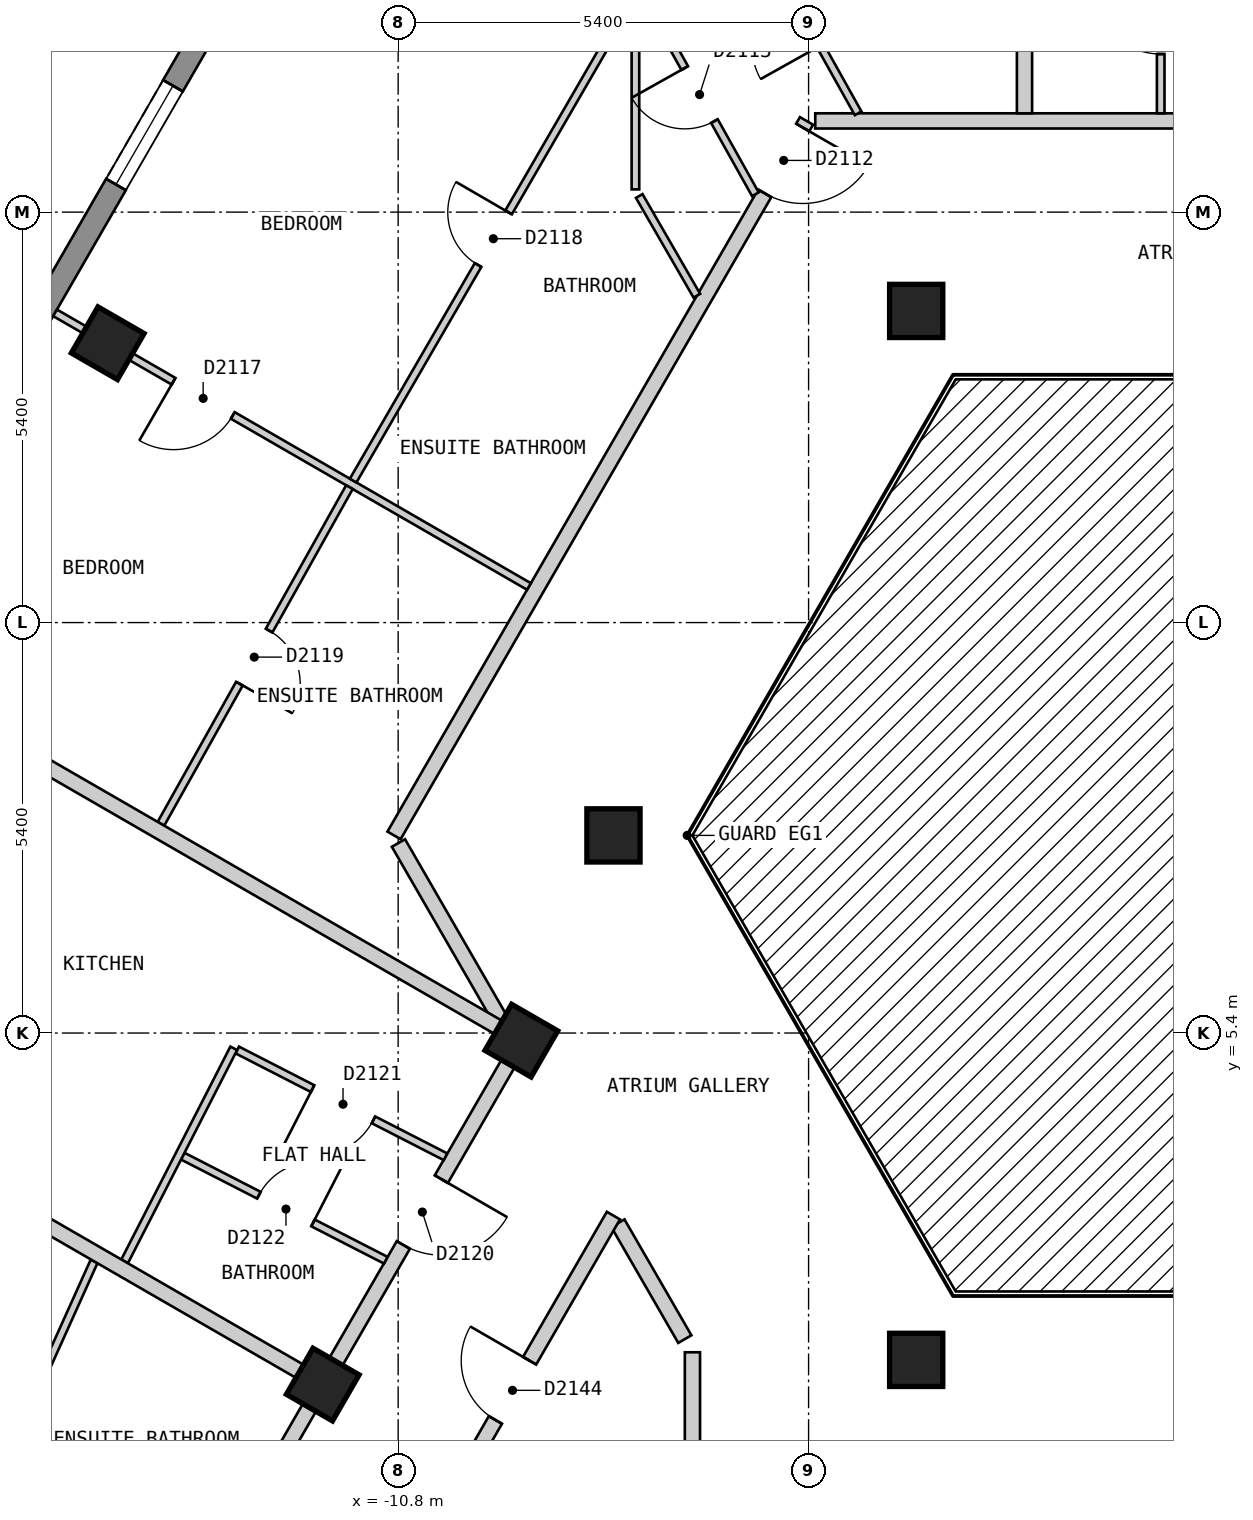
"""IFC4 building model, lengths in metres.
Left out: names, types, materials, properties, quantities, classifications, styles, units other than length and angle.
Written with IfcOpenShell. Run it as: python <this file> out.ifc"""

import sys

from ifc_helpers import new_model, si_unit, direction, frame, frame_2d, origin, origin_2d, place, context, subcontext, project, spatial, polyline, rectangle, outline, extrude, element, fill, save


model = new_model("IFC4")
c1 = context("Model", 3, precision=1e-05, world=origin(), true_north=direction((0.0, 1.0)))
c2 = subcontext(c1, "Body", "Model", "MODEL_VIEW")
j1 = project(units=[si_unit("LENGTHUNIT", "METRE"), si_unit("PLANEANGLEUNIT", "RADIAN")], contexts=[c1])
p1 = place(None, origin())
s1 = spatial("IfcSite", under=j1, at=p1, CompositionType="ELEMENT")
p2 = place(p1, origin())
s2 = spatial("IfcBuilding", under=s1, at=p2, CompositionType="ELEMENT")
p3 = place(p2, frame((0.0, 0.0, 211.8)))
s3 = spatial("IfcBuildingStorey", under=s2, at=p3, CompositionType="ELEMENT", Elevation=211.8)
for number, where, z_axis, x_axis in (
    (1, (-14.621, 14.475, 0.0), (0.0, 0.0, 1.0), (-0.5, -0.866, 0.0)),
    (2, (-3.984, 14.9, 0.0), (0.0, 0.0, 1.0), (1.0, 0.0, 0.0)),
    (3, (-7.967, 8.0, 0.0), (0.0, 0.0, 1.0), (1.0, 0.0, 0.0)),
    (4, (-9.179, 5.3, 0.0), (0.0, 0.0, 1.0), (-0.5, -0.866, 0.0)),
    (5, (-3.984, 1.1, 0.0), (0.0, 0.0, 1.0), (1.0, 0.0, 0.0)),
    (6, (-11.792, 0.775, 0.0), (0.0, 0.0, 1.0), (-0.5, -0.866, 0.0)),
):
    element("IfcColumn", number, at=place(p3, frame(where, z_axis=z_axis, x_axis=x_axis)), inside=s3, PredefinedType="COLUMN", context=c2, shape_type="SweptSolid", body=[
        extrude(rectangle(XDim=0.7, YDim=0.7, at=origin_2d()), origin(), (0.0, 0.0, 1.0), 3.0),
    ])
p4 = place(p3, frame((-12.514, 20.025, 0.0), z_axis=(0.0, 0.0, 1.0), x_axis=(-0.500003656944, -0.866023292436, 0.0)))
e7 = element("IfcWall", 7, at=p4, inside=s3, PredefinedType="SOLIDWALL", context=c2, shape_type="SweptSolid", body=[
    extrude(outline(polyline([(0.0, -0.15), (22.17, -0.15), (22.09, 0.15), (0.08, 0.15), (0.0, -0.15)])), origin(), (0.0, 0.0, 1.0), 2.7),
])
p5 = place(p4, frame((2.497, 0.0, 0.15)))
e8 = element("IfcOpeningElement", 8, at=p5, cuts=e7, PredefinedType="OPENING", context=c2, shape_type="SweptSolid", body=[
    extrude(rectangle(XDim=1.5, YDim=2.1, at=frame_2d((0.75, 1.05))), frame((0.0, 0.16, 0.0), z_axis=(0.0, -1.0, 0.0), x_axis=(1.0, 0.0, 0.0)), (0.0, 0.0, 1.0), 0.32),
])
p6 = place(p4, frame((7.722, 0.0, 0.15)))
e9 = element("IfcOpeningElement", 9, at=p6, cuts=e7, PredefinedType="OPENING", context=c2, shape_type="SweptSolid", body=[
    extrude(rectangle(XDim=1.5, YDim=2.1, at=frame_2d((0.75, 1.05))), frame((0.0, 0.16, 0.0), z_axis=(0.0, -1.0, 0.0), x_axis=(1.0, 0.0, 0.0)), (0.0, 0.0, 1.0), 0.32),
])
p7 = place(p4, frame((12.948, 0.0, 0.15)))
e10 = element("IfcOpeningElement", 10, at=p7, cuts=e7, PredefinedType="OPENING", context=c2, shape_type="SweptSolid", body=[
    extrude(rectangle(XDim=1.5, YDim=2.1, at=frame_2d((0.75, 1.05))), frame((0.0, 0.16, 0.0), z_axis=(0.0, -1.0, 0.0), x_axis=(1.0, 0.0, 0.0)), (0.0, 0.0, 1.0), 0.32),
])
p8 = place(p4, frame((18.173, 0.0, 0.15)))
e11 = element("IfcOpeningElement", 11, at=p8, cuts=e7, PredefinedType="OPENING", context=c2, shape_type="SweptSolid", body=[
    extrude(rectangle(XDim=1.5, YDim=2.1, at=frame_2d((0.75, 1.05))), frame((0.0, 0.16, 0.0), z_axis=(0.0, -1.0, 0.0), x_axis=(1.0, 0.0, 0.0)), (0.0, 0.0, 1.0), 0.32),
])
p9 = place(p3, frame((-10.796, 7.9, 0.0), z_axis=(0.0, 0.0, 1.0), x_axis=(0.499698840221, -0.866199208659, 0.0)))
e12 = element("IfcWall", 12, at=p9, inside=s3, PredefinedType="PARTITIONING", context=c2, shape_type="SweptSolid", body=[
    extrude(rectangle(XDim=2.685, YDim=0.2, at=frame_2d((1.343, 0.0))), origin(), (0.0, 0.0, 1.0), 2.7),
])
p10 = place(p3, frame((-7.909, 2.898, 0.0), z_axis=(0.0, 0.0, 1.0), x_axis=(0.50019444547, -0.865913111531, 0.0)))
e13 = element("IfcWall", 13, at=p10, inside=s3, PredefinedType="PARTITIONING", context=c2, shape_type="SweptSolid", body=[
    extrude(rectangle(XDim=1.761, YDim=0.2, at=frame_2d((0.88, 0.0))), origin(), (0.0, 0.0, 1.0), 2.7),
])
p11 = place(p3, frame((-5.312, 17.4, 0.0), z_axis=(0.0, 0.0, 1.0), x_axis=(1.0, 0.0, 0.0)))
e14 = element("IfcWall", 14, at=p11, inside=s3, PredefinedType="PARTITIONING", context=c2, shape_type="SweptSolid", body=[
    extrude(rectangle(XDim=10.739, YDim=0.2, at=frame_2d((5.37, 0.0))), origin(), (0.0, 0.0, 1.0), 2.7),
])
p12 = place(p11, frame((9.534, 0.0, 0.0)))
e15 = element("IfcOpeningElement", 15, at=p12, cuts=e14, PredefinedType="OPENING", context=c2, shape_type="SweptSolid", body=[
    extrude(rectangle(XDim=1.0, YDim=2.1, at=frame_2d((0.5, 1.05))), frame((0.0, 0.11, 0.0), z_axis=(0.0, -1.0, 0.0), x_axis=(1.0, 0.0, 0.0)), (0.0, 0.0, 1.0), 0.22),
])
p13 = place(p11, frame((4.812, 0.0, 0.0)))
e16 = element("IfcOpeningElement", 16, at=p13, cuts=e14, PredefinedType="OPENING", context=c2, shape_type="SweptSolid", body=[
    extrude(rectangle(XDim=1.0, YDim=2.1, at=frame_2d((0.5, 1.05))), frame((0.0, 0.11, 0.0), z_axis=(0.0, -1.0, 0.0), x_axis=(1.0, 0.0, 0.0)), (0.0, 0.0, 1.0), 0.22),
])
p14 = place(p3, frame((-10.623, -1.6, 0.0), z_axis=(0.0, 0.0, 1.0), x_axis=(0.500040865889, 0.866001808567, 0.0)))
e17 = element("IfcWall", 17, at=p14, inside=s3, PredefinedType="PARTITIONING", context=c2, shape_type="SweptSolid", body=[
    extrude(rectangle(XDim=5.31, YDim=0.2, at=frame_2d((2.655, 0.0))), origin(), (0.0, 0.0, 1.0), 2.7),
])
p15 = place(p14, frame((2.205, 0.0, 0.0)))
e18 = element("IfcOpeningElement", 18, at=p15, cuts=e17, PredefinedType="OPENING", context=c2, shape_type="SweptSolid", body=[
    extrude(rectangle(XDim=0.9, YDim=2.1, at=frame_2d((0.45, 1.05))), frame((0.0, 0.11, 0.0), z_axis=(0.0, -1.0, 0.0), x_axis=(1.0, 0.0, 0.0)), (0.0, 0.0, 1.0), 0.22),
])
p16 = place(p3, frame((-13.106, -1.5, 0.0), z_axis=(0.0, 0.0, 1.0), x_axis=(0.500025705601, 0.86601056214, 0.0)))
e19 = element("IfcWall", 19, at=p16, inside=s3, PredefinedType="PARTITIONING", context=c2, shape_type="SweptSolid", body=[
    extrude(rectangle(XDim=7.735, YDim=0.2, at=frame_2d((3.868, 0.0))), origin(), (0.0, 0.0, 1.0), 2.7),
])
p17 = place(p16, frame((4.748, 0.0, 0.0)))
e20 = element("IfcOpeningElement", 20, at=p17, cuts=e19, PredefinedType="OPENING", context=c2, shape_type="SweptSolid", body=[
    extrude(rectangle(XDim=1.0, YDim=2.1, at=frame_2d((0.5, 1.05))), frame((0.0, 0.11, 0.0), z_axis=(0.0, -1.0, 0.0), x_axis=(1.0, 0.0, 0.0)), (0.0, 0.0, 1.0), 0.22),
])
p18 = place(p3, frame((-10.854, 8.0, 0.0), z_axis=(0.0, 0.0, 1.0), x_axis=(0.499997637144, 0.866026767976, 0.0)))
e21 = element("IfcWall", 21, at=p18, inside=s3, PredefinedType="PARTITIONING", context=c2, shape_type="SweptSolid", body=[
    extrude(rectangle(XDim=10.854, YDim=0.2, at=frame_2d((5.427, 0.0))), origin(), (0.0, 0.0, 1.0), 2.7),
])
p19 = place(p18, frame((9.754, 0.0, 0.0)))
e22 = element("IfcOpeningElement", 22, at=p19, cuts=e21, PredefinedType="OPENING", context=c2, shape_type="SweptSolid", body=[
    extrude(rectangle(XDim=1.0, YDim=2.1, at=frame_2d((0.5, 1.05))), frame((0.0, 0.11, 0.0), z_axis=(0.0, -1.0, 0.0), x_axis=(1.0, 0.0, 0.0)), (0.0, 0.0, 1.0), 0.22),
])
p20 = place(p3, frame((-6.928, -2.799, 0.0), z_axis=(0.0, 0.0, 1.0), x_axis=(0.0, 1.0, 0.0)))
e23 = element("IfcWall", 23, at=p20, inside=s3, PredefinedType="PARTITIONING", context=c2, shape_type="SweptSolid", body=[
    extrude(rectangle(XDim=3.999, YDim=0.2, at=frame_2d((2.0, 0.0))), origin(), (0.0, 0.0, 1.0), 2.7),
])
p21 = place(p3, frame((-7.628, 16.412, 0.0), z_axis=(0.0, 0.0, 1.0), x_axis=(0.500159472144, -0.86593331292, 0.0)))
e24 = element("IfcWall", 24, at=p21, inside=s3, PredefinedType="PARTITIONING", context=c2, shape_type="SweptSolid", body=[
    extrude(rectangle(XDim=1.515, YDim=0.1, at=frame_2d((0.758, 0.0))), origin(), (0.0, 0.0, 1.0), 2.7),
])
p22 = place(p3, frame((-6.211, 20.115, 0.0), z_axis=(0.0, 0.0, 1.0), x_axis=(0.488221234931, -0.872719901092, 0.0)))
e25 = element("IfcWall", 25, at=p22, inside=s3, PredefinedType="PARTITIONING", context=c2, shape_type="SweptSolid", body=[
    extrude(rectangle(XDim=2.996, YDim=0.1, at=frame_2d((1.498, 0.0))), origin(), (0.0, 0.0, 1.0), 2.7),
])
p23 = place(p22, frame((1.077, 0.0, 0.0)))
e26 = element("IfcOpeningElement", 26, at=p23, cuts=e25, PredefinedType="OPENING", context=c2, shape_type="SweptSolid", body=[
    extrude(rectangle(XDim=0.9, YDim=2.1, at=frame_2d((0.45, 1.05))), frame((0.0, 0.06, 0.0), z_axis=(0.0, -1.0, 0.0), x_axis=(1.0, 0.0, 0.0)), (0.0, 0.0, 1.0), 0.12),
])
p24 = place(p3, frame((-7.575, 19.07, 0.0), z_axis=(0.0, 0.0, 1.0), x_axis=(0.488413788688, -0.872612153834, 0.0)))
e27 = element("IfcWall", 27, at=p24, inside=s3, PredefinedType="PARTITIONING", context=c2, shape_type="SweptSolid", body=[
    extrude(rectangle(XDim=3.02, YDim=0.1, at=frame_2d((1.51, 0.0))), origin(), (0.0, 0.0, 1.0), 2.7),
])
p25 = place(p24, frame((1.117, 0.0, 0.0)))
e28 = element("IfcOpeningElement", 28, at=p25, cuts=e27, PredefinedType="OPENING", context=c2, shape_type="SweptSolid", body=[
    extrude(rectangle(XDim=0.8, YDim=2.1, at=frame_2d((0.4, 1.05))), frame((0.0, 0.06, 0.0), z_axis=(0.0, -1.0, 0.0), x_axis=(1.0, 0.0, 0.0)), (0.0, 0.0, 1.0), 0.12),
])
p26 = place(p3, frame((-12.917, 5.177, 0.0), z_axis=(0.0, 0.0, 1.0), x_axis=(0.889829844516, -0.456292502467, 0.0)))
e29 = element("IfcWall", 29, at=p26, inside=s3, PredefinedType="PARTITIONING", context=c2, shape_type="SweptSolid", body=[
    extrude(rectangle(XDim=3.079, YDim=0.1, at=frame_2d((1.54, 0.0))), origin(), (0.0, 0.0, 1.0), 2.7),
])
p27 = place(p26, frame((1.114, 0.0, 0.0)))
e30 = element("IfcOpeningElement", 30, at=p27, cuts=e29, PredefinedType="OPENING", context=c2, shape_type="SweptSolid", body=[
    extrude(rectangle(XDim=0.9, YDim=2.1, at=frame_2d((0.45, 1.05))), frame((0.0, 0.06, 0.0), z_axis=(0.0, -1.0, 0.0), x_axis=(1.0, 0.0, 0.0)), (0.0, 0.0, 1.0), 0.12),
])
p28 = place(p3, frame((-13.634, 3.78, 0.0), z_axis=(0.0, 0.0, 1.0), x_axis=(0.889908901513, -0.456138298116, 0.0)))
e31 = element("IfcWall", 31, at=p28, inside=s3, PredefinedType="PARTITIONING", context=c2, shape_type="SweptSolid", body=[
    extrude(rectangle(XDim=3.002, YDim=0.1, at=frame_2d((1.501, 0.0))), origin(), (0.0, 0.0, 1.0), 2.7),
])
p29 = place(p28, frame((1.126, 0.0, 0.0)))
e32 = element("IfcOpeningElement", 32, at=p29, cuts=e31, PredefinedType="OPENING", context=c2, shape_type="SweptSolid", body=[
    extrude(rectangle(XDim=0.8, YDim=2.1, at=frame_2d((0.4, 1.05))), frame((0.0, 0.06, 0.0), z_axis=(0.0, -1.0, 0.0), x_axis=(1.0, 0.0, 0.0)), (0.0, 0.0, 1.0), 0.12),
])
p30 = place(p3, frame((-15.314, 14.875, 0.0), z_axis=(0.0, 0.0, 1.0), x_axis=(0.866001485781, -0.500041424909, 0.0)))
e33 = element("IfcWall", 33, at=p30, inside=s3, PredefinedType="PARTITIONING", context=c2, shape_type="SweptSolid", body=[
    extrude(rectangle(XDim=7.2, YDim=0.1, at=frame_2d((3.6, 0.0))), origin(), (0.0, 0.0, 1.0), 2.7),
])
p31 = place(p30, frame((1.8, 0.0, 0.0)))
e34 = element("IfcOpeningElement", 34, at=p31, cuts=e33, PredefinedType="OPENING", context=c2, shape_type="SweptSolid", body=[
    extrude(rectangle(XDim=0.9, YDim=2.1, at=frame_2d((0.45, 1.05))), frame((0.0, 0.06, 0.0), z_axis=(0.0, -1.0, 0.0), x_axis=(1.0, 0.0, 0.0)), (0.0, 0.0, 1.0), 0.12),
])
p32 = place(p3, frame((-15.575, 0.677, 0.0), z_axis=(0.0, 0.0, 1.0), x_axis=(0.410768223147, 0.911739802165, 0.0)))
e35 = element("IfcWall", 35, at=p32, inside=s3, PredefinedType="PARTITIONING", context=c2, shape_type="SweptSolid", body=[
    extrude(rectangle(XDim=1.886, YDim=0.1, at=frame_2d((0.943, 0.0))), origin(), (0.0, 0.0, 1.0), 2.7),
])
p33 = place(p3, frame((-11.392, 12.668, 0.0), z_axis=(0.0, 0.0, 1.0), x_axis=(0.501440551074, 0.865192102217, 0.0)))
e36 = element("IfcWall", 36, at=p33, inside=s3, PredefinedType="PARTITIONING", context=c2, shape_type="SweptSolid", body=[
    extrude(rectangle(XDim=7.307, YDim=0.1, at=frame_2d((3.654, 0.0))), origin(), (0.0, 0.0, 1.0), 2.7),
])
p34 = place(p33, frame((3.278, 0.0, 0.0)))
e37 = element("IfcOpeningElement", 37, at=p34, cuts=e36, PredefinedType="OPENING", context=c2, shape_type="SweptSolid", body=[
    extrude(rectangle(XDim=0.8, YDim=2.1, at=frame_2d((0.4, 1.05))), frame((0.0, 0.06, 0.0), z_axis=(0.0, -1.0, 0.0), x_axis=(1.0, 0.0, 0.0)), (0.0, 0.0, 1.0), 0.12),
])
p35 = place(p3, frame((-13.921, 8.153, 0.0), z_axis=(0.0, 0.0, 1.0), x_axis=(0.488568218554, 0.872525699231, 0.0)))
e38 = element("IfcWall", 38, at=p35, inside=s3, PredefinedType="PARTITIONING", context=c2, shape_type="SweptSolid", body=[
    extrude(rectangle(XDim=5.076, YDim=0.1, at=frame_2d((2.538, 0.0))), origin(), (0.0, 0.0, 1.0), 2.7),
])
p36 = place(p35, frame((2.113, 0.0, 0.0)))
e39 = element("IfcOpeningElement", 39, at=p36, cuts=e38, PredefinedType="OPENING", context=c2, shape_type="SweptSolid", body=[
    extrude(rectangle(XDim=0.8, YDim=2.1, at=frame_2d((0.4, 1.05))), frame((0.0, 0.06, 0.0), z_axis=(0.0, -1.0, 0.0), x_axis=(1.0, 0.0, 0.0)), (0.0, 0.0, 1.0), 0.12),
])
p37 = place(p3, frame((-14.399, 2.396, 0.0), z_axis=(0.0, 0.0, 1.0), x_axis=(0.455967231787, 0.889996563778, 0.0)))
e40 = element("IfcWall", 40, at=p37, inside=s3, PredefinedType="PARTITIONING", context=c2, shape_type="SweptSolid", body=[
    extrude(rectangle(XDim=3.149, YDim=0.1, at=frame_2d((1.575, 0.0))), origin(), (0.0, 0.0, 1.0), 2.7),
])
p38 = place(p3, frame((-7.678, 16.499, 0.0), z_axis=(0.0, 0.0, 1.0), x_axis=(0.0, 1.0, 0.0)))
e41 = element("IfcWall", 41, at=p38, inside=s3, PredefinedType="PARTITIONING", context=c2, shape_type="SweptSolid", body=[
    extrude(rectangle(XDim=5.801, YDim=0.1, at=frame_2d((2.9, 0.0))), origin(), (0.0, 0.0, 1.0), 2.7),
])
p39 = place(p38, frame((3.44, 0.0, 0.0)))
e42 = element("IfcOpeningElement", 42, at=p39, cuts=e41, PredefinedType="OPENING", context=c2, shape_type="SweptSolid", body=[
    extrude(rectangle(XDim=0.9, YDim=2.1, at=frame_2d((0.45, 1.05))), frame((0.0, 0.06, 0.0), z_axis=(0.0, -1.0, 0.0), x_axis=(1.0, 0.0, 0.0)), (0.0, 0.0, 1.0), 0.12),
])
p40 = place(p3, frame((-0.767, 17.5, 0.0), z_axis=(0.0, 0.0, 1.0), x_axis=(0.0, 1.0, 0.0)))
e43 = element("IfcWall", 43, at=p40, inside=s3, PredefinedType="PARTITIONING", context=c2, shape_type="SweptSolid", body=[
    extrude(rectangle(XDim=2.559, YDim=0.1, at=frame_2d((1.28, 0.0))), origin(), (0.0, 0.0, 1.0), 2.7),
])
p41 = place(p40, frame((0.78, 0.0, 0.0)))
e44 = element("IfcOpeningElement", 44, at=p41, cuts=e43, PredefinedType="OPENING", context=c2, shape_type="SweptSolid", body=[
    extrude(rectangle(XDim=0.9, YDim=2.1, at=frame_2d((0.45, 1.05))), frame((0.0, 0.06, 0.0), z_axis=(0.0, -1.0, 0.0), x_axis=(1.0, 0.0, 0.0)), (0.0, 0.0, 1.0), 0.12),
])
p42 = place(p3, frame((-2.559, 20.22, 0.0), z_axis=(0.0, 0.0, 1.0), x_axis=(0.0, -1.0, 0.0)))
e45 = element("IfcWall", 45, at=p42, inside=s3, PredefinedType="PARTITIONING", context=c2, shape_type="SweptSolid", body=[
    extrude(rectangle(XDim=2.72, YDim=0.2, at=frame_2d((1.36, 0.0))), origin(), (0.0, 0.0, 1.0), 2.7),
])
p43 = place(p3, frame((-20.539, 5.825, 0.0), z_axis=(0.0, 0.0, 1.0), x_axis=(0.866046068403, -0.499964206122, 0.0)))
e46 = element("IfcWall", 46, at=p43, inside=s3, PredefinedType="PARTITIONING", context=c2, shape_type="SweptSolid", body=[
    extrude(rectangle(XDim=9.995, YDim=0.2, at=frame_2d((4.998, 0.0))), origin(), (0.0, 0.0, 1.0), 2.7),
])
p44 = place(p3, frame((-17.926, 10.35, 0.0), z_axis=(0.0, 0.0, 1.0), x_axis=(0.866018411306, -0.500012111133, 0.0)))
e47 = element("IfcWall", 47, at=p44, inside=s3, PredefinedType="PARTITIONING", context=c2, shape_type="SweptSolid", body=[
    extrude(rectangle(XDim=9.898, YDim=0.2, at=frame_2d((4.949, 0.0))), origin(), (0.0, 0.0, 1.0), 2.7),
])
p45 = place(p5, origin())
e48 = element("IfcWindow", 48, at=p45, inside=s3, PartitioningType="SINGLE_PANEL", PredefinedType="WINDOW", context=c2, shape_type="SweptSolid", body=[
    extrude(rectangle(XDim=1.5, YDim=2.1, at=frame_2d((0.75, 1.05))), frame((0.0, 0.03, 0.0), z_axis=(0.0, -1.0, 0.0), x_axis=(1.0, 0.0, 0.0)), (0.0, 0.0, 1.0), 0.06),
])
fill(e8, e48)
p46 = place(p41, origin())
e49 = element("IfcDoor", 49, at=p46, inside=s3, OperationType="SINGLE_SWING_RIGHT", PredefinedType="DOOR", context=c2, shape_type="SweptSolid", body=[
    extrude(rectangle(XDim=0.9, YDim=2.1, at=frame_2d((0.45, 1.05))), frame((0.0, 0.025, 0.0), z_axis=(0.0, -1.0, 0.0), x_axis=(1.0, 0.0, 0.0)), (0.0, 0.0, 1.0), 0.05),
])
fill(e44, e49)
p47 = place(p19, origin())
e50 = element("IfcDoor", 50, at=p47, inside=s3, OperationType="SINGLE_SWING_RIGHT", PredefinedType="DOOR", context=c2, shape_type="SweptSolid", body=[
    extrude(rectangle(XDim=1.0, YDim=2.1, at=frame_2d((0.5, 1.05))), frame((0.0, 0.025, 0.0), z_axis=(0.0, -1.0, 0.0), x_axis=(1.0, 0.0, 0.0)), (0.0, 0.0, 1.0), 0.05),
])
fill(e22, e50)
p48 = place(p25, origin())
e51 = element("IfcDoor", 51, at=p48, inside=s3, OperationType="SINGLE_SWING_LEFT", PredefinedType="DOOR", context=c2, shape_type="SweptSolid", body=[
    extrude(rectangle(XDim=0.8, YDim=2.1, at=frame_2d((0.4, 1.05))), frame((0.0, 0.025, 0.0), z_axis=(0.0, -1.0, 0.0), x_axis=(1.0, 0.0, 0.0)), (0.0, 0.0, 1.0), 0.05),
])
fill(e28, e51)
p49 = place(p31, origin())
e52 = element("IfcDoor", 52, at=p49, inside=s3, OperationType="SINGLE_SWING_LEFT", PredefinedType="DOOR", context=c2, shape_type="SweptSolid", body=[
    extrude(rectangle(XDim=0.9, YDim=2.1, at=frame_2d((0.45, 1.05))), frame((0.0, 0.025, 0.0), z_axis=(0.0, -1.0, 0.0), x_axis=(1.0, 0.0, 0.0)), (0.0, 0.0, 1.0), 0.05),
])
fill(e34, e52)
p50 = place(p34, origin())
e53 = element("IfcDoor", 53, at=p50, inside=s3, OperationType="SINGLE_SWING_RIGHT", PredefinedType="DOOR", context=c2, shape_type="SweptSolid", body=[
    extrude(rectangle(XDim=0.8, YDim=2.1, at=frame_2d((0.4, 1.05))), frame((0.0, 0.025, 0.0), z_axis=(0.0, -1.0, 0.0), x_axis=(1.0, 0.0, 0.0)), (0.0, 0.0, 1.0), 0.05),
])
fill(e37, e53)
p51 = place(p36, origin())
e54 = element("IfcDoor", 54, at=p51, inside=s3, OperationType="SINGLE_SWING_LEFT", PredefinedType="DOOR", context=c2, shape_type="SweptSolid", body=[
    extrude(rectangle(XDim=0.8, YDim=2.1, at=frame_2d((0.4, 1.05))), frame((0.0, 0.025, 0.0), z_axis=(0.0, -1.0, 0.0), x_axis=(1.0, 0.0, 0.0)), (0.0, 0.0, 1.0), 0.05),
])
fill(e39, e54)
p52 = place(p17, origin())
e55 = element("IfcDoor", 55, at=p52, inside=s3, OperationType="SINGLE_SWING_RIGHT", PredefinedType="DOOR", context=c2, shape_type="SweptSolid", body=[
    extrude(rectangle(XDim=1.0, YDim=2.1, at=frame_2d((0.5, 1.05))), frame((0.0, 0.025, 0.0), z_axis=(0.0, -1.0, 0.0), x_axis=(1.0, 0.0, 0.0)), (0.0, 0.0, 1.0), 0.05),
])
fill(e20, e55)
p53 = place(p27, origin())
e56 = element("IfcDoor", 56, at=p53, inside=s3, OperationType="SINGLE_SWING_LEFT", PredefinedType="DOOR", context=c2, shape_type="SweptSolid", body=[
    extrude(rectangle(XDim=0.9, YDim=2.1, at=frame_2d((0.45, 1.05))), frame((0.0, 0.025, 0.0), z_axis=(0.0, -1.0, 0.0), x_axis=(1.0, 0.0, 0.0)), (0.0, 0.0, 1.0), 0.05),
])
fill(e30, e56)
p54 = place(p29, origin())
e57 = element("IfcDoor", 57, at=p54, inside=s3, OperationType="SINGLE_SWING_RIGHT", PredefinedType="DOOR", context=c2, shape_type="SweptSolid", body=[
    extrude(rectangle(XDim=0.8, YDim=2.1, at=frame_2d((0.4, 1.05))), frame((0.0, 0.025, 0.0), z_axis=(0.0, -1.0, 0.0), x_axis=(1.0, 0.0, 0.0)), (0.0, 0.0, 1.0), 0.05),
])
fill(e32, e57)
p55 = place(p15, origin())
e58 = element("IfcDoor", 58, at=p55, inside=s3, OperationType="SINGLE_SWING_RIGHT", PredefinedType="DOOR", context=c2, shape_type="SweptSolid", body=[
    extrude(rectangle(XDim=0.9, YDim=2.1, at=frame_2d((0.45, 1.05))), frame((0.0, 0.025, 0.0), z_axis=(0.0, -1.0, 0.0), x_axis=(1.0, 0.0, 0.0)), (0.0, 0.0, 1.0), 0.05),
])
fill(e18, e58)
save(model, sys.argv[1])
